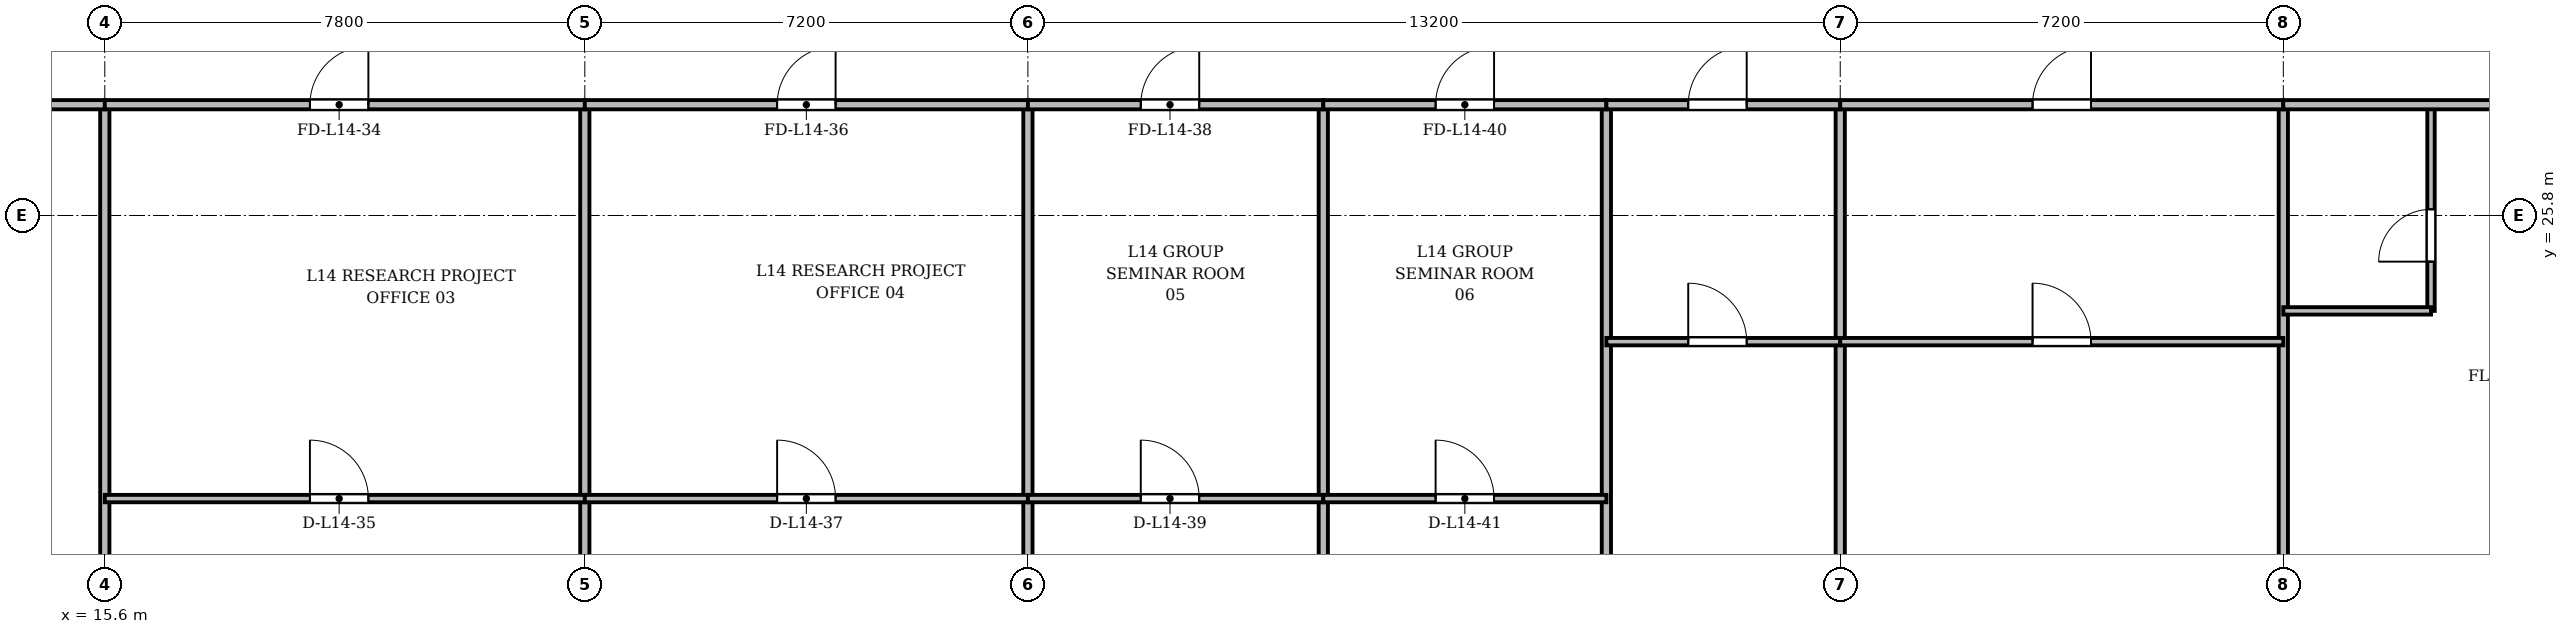
"""IFC4 building model, lengths in metres.
Left out: names, types, materials, properties, quantities, classifications, styles, units other than length and angle.
Written with IfcOpenShell. Run it as: python <this file> out.ifc"""

import sys

from ifc_helpers import new_model, si_unit, direction, frame, frame_2d, origin, place, context, subcontext, project, spatial, rectangle, extrude, source, transform, mapped, element, fill, save


model = new_model("IFC4")
c1 = context("Model", 3, precision=1e-05, world=origin(), true_north=direction((0.0, 1.0)))
c2 = subcontext(c1, "Body", "Model", "MODEL_VIEW")
j1 = project(units=[si_unit("LENGTHUNIT", "METRE"), si_unit("PLANEANGLEUNIT", "RADIAN")], contexts=[c1])
p1 = place(None, origin())
s1 = spatial("IfcSite", under=j1, at=p1, CompositionType="ELEMENT")
p2 = place(p1, origin())
s2 = spatial("IfcBuilding", under=s1, at=p2, CompositionType="ELEMENT")
p3 = place(p2, frame((0.0, 0.0, 55.9)))
s3 = spatial("IfcBuildingStorey", under=s2, at=p3, CompositionType="ELEMENT", Elevation=55.9)
for number, where, z_axis, x_axis in (
    (1, (15.6, 3.145, 0.0), (0.0, 0.0, 1.0), (0.0, 1.0, 0.0)),
    (2, (23.4, 3.145, 0.0), (0.0, 0.0, 1.0), (0.0, 1.0, 0.0)),
    (3, (30.6, 3.145, 0.0), (0.0, 0.0, 1.0), (0.0, 1.0, 0.0)),
):
    element("IfcWall", number, at=place(p3, frame(where, z_axis=z_axis, x_axis=x_axis)), inside=s3, PredefinedType="PARTITIONING", context=c2, shape_type="SweptSolid", body=[
        extrude(rectangle(XDim=24.455, YDim=0.15, at=frame_2d((12.228, 0.0))), origin(), (0.0, 0.0, 1.0), 2.752),
    ])
for number, where, z_axis, x_axis in (
    (4, (35.4, 3.145, 0.0), (0.0, 0.0, 1.0), (0.0, 1.0, 0.0)),
    (5, (40.0, 3.145, 0.0), (0.0, 0.0, 1.0), (0.0, 1.0, 0.0)),
):
    element("IfcWall", number, at=place(p3, frame(where, z_axis=z_axis, x_axis=x_axis)), inside=s3, PredefinedType="PARTITIONING", context=c2, shape_type="SweptSolid", body=[
        extrude(rectangle(XDim=24.455, YDim=0.15, at=frame_2d((12.228, 0.0))), origin(), (0.0, 0.0, 1.0), 2.69),
    ])
for number, where, z_axis, x_axis in (
    (6, (43.8, 3.145, 0.0), (0.0, 0.0, 1.0), (0.0, 1.0, 0.0)),
    (7, (51.0, 3.145, 0.0), (0.0, 0.0, 1.0), (0.0, 1.0, 0.0)),
):
    element("IfcWall", number, at=place(p3, frame(where, z_axis=z_axis, x_axis=x_axis)), inside=s3, PredefinedType="PARTITIONING", context=c2, shape_type="SweptSolid", body=[
        extrude(rectangle(XDim=24.455, YDim=0.15, at=frame_2d((12.228, 0.0))), origin(), (0.0, 0.0, 1.0), 2.752),
    ])
p4 = place(p3, frame((8.8, 27.6, 0.0), z_axis=(0.0, 0.0, 1.0), x_axis=(1.0, 0.0, 0.0)))
e8 = element("IfcWall", 8, at=p4, inside=s3, PredefinedType="PARTITIONING", context=c2, shape_type="SweptSolid", body=[
    extrude(rectangle(XDim=6.8, YDim=0.15, at=frame_2d((3.4, 0.0))), origin(), (0.0, 0.0, 1.0), 2.752),
])
p5 = place(p4, frame((4.49, 0.0, 0.0)))
e9 = element("IfcOpeningElement", 9, at=p5, cuts=e8, PredefinedType="OPENING", context=c2, shape_type="SweptSolid", body=[
    extrude(rectangle(XDim=0.95, YDim=2.15, at=frame_2d((0.475, 1.075))), frame((0.0, 0.085, 0.0), z_axis=(0.0, -1.0, 0.0), x_axis=(1.0, 0.0, 0.0)), (0.0, 0.0, 1.0), 0.17),
])
p6 = place(p3, frame((15.6, 27.6, 0.0), z_axis=(0.0, 0.0, 1.0), x_axis=(1.0, 0.0, 0.0)))
e10 = element("IfcWall", 10, at=p6, inside=s3, PredefinedType="PARTITIONING", context=c2, shape_type="SweptSolid", body=[
    extrude(rectangle(XDim=7.8, YDim=0.15, at=frame_2d((3.9, 0.0))), origin(), (0.0, 0.0, 1.0), 2.752),
])
p7 = place(p6, frame((3.333, 0.0, 0.0)))
e11 = element("IfcOpeningElement", 11, at=p7, cuts=e10, PredefinedType="OPENING", context=c2, shape_type="SweptSolid", body=[
    extrude(rectangle(XDim=0.95, YDim=2.15, at=frame_2d((0.475, 1.075))), frame((0.0, 0.085, 0.0), z_axis=(0.0, -1.0, 0.0), x_axis=(1.0, 0.0, 0.0)), (0.0, 0.0, 1.0), 0.17),
])
p8 = place(p3, frame((15.6, 21.2, 0.0), z_axis=(0.0, 0.0, 1.0), x_axis=(1.0, 0.0, 0.0)))
e12 = element("IfcWall", 12, at=p8, inside=s3, PredefinedType="PARTITIONING", context=c2, shape_type="SweptSolid", body=[
    extrude(rectangle(XDim=7.8, YDim=0.12, at=frame_2d((3.9, 0.0))), origin(), (0.0, 0.0, 1.0), 2.752),
])
p9 = place(p8, frame((3.333, 0.0, 0.0)))
e13 = element("IfcOpeningElement", 13, at=p9, cuts=e12, PredefinedType="OPENING", context=c2, shape_type="SweptSolid", body=[
    extrude(rectangle(XDim=0.95, YDim=2.15, at=frame_2d((0.475, 1.075))), frame((0.0, 0.07, 0.0), z_axis=(0.0, -1.0, 0.0), x_axis=(1.0, 0.0, 0.0)), (0.0, 0.0, 1.0), 0.14),
])
p10 = place(p3, frame((23.4, 27.6, 0.0), z_axis=(0.0, 0.0, 1.0), x_axis=(1.0, 0.0, 0.0)))
e14 = element("IfcWall", 14, at=p10, inside=s3, PredefinedType="PARTITIONING", context=c2, shape_type="SweptSolid", body=[
    extrude(rectangle(XDim=7.2, YDim=0.15, at=frame_2d((3.6, 0.0))), origin(), (0.0, 0.0, 1.0), 2.752),
])
p11 = place(p10, frame((3.125, 0.0, 0.0)))
e15 = element("IfcOpeningElement", 15, at=p11, cuts=e14, PredefinedType="OPENING", context=c2, shape_type="SweptSolid", body=[
    extrude(rectangle(XDim=0.95, YDim=2.15, at=frame_2d((0.475, 1.075))), frame((0.0, 0.085, 0.0), z_axis=(0.0, -1.0, 0.0), x_axis=(1.0, 0.0, 0.0)), (0.0, 0.0, 1.0), 0.17),
])
p12 = place(p3, frame((23.4, 21.2, 0.0), z_axis=(0.0, 0.0, 1.0), x_axis=(1.0, 0.0, 0.0)))
e16 = element("IfcWall", 16, at=p12, inside=s3, PredefinedType="PARTITIONING", context=c2, shape_type="SweptSolid", body=[
    extrude(rectangle(XDim=7.2, YDim=0.12, at=frame_2d((3.6, 0.0))), origin(), (0.0, 0.0, 1.0), 2.752),
])
p13 = place(p12, frame((3.125, 0.0, 0.0)))
e17 = element("IfcOpeningElement", 17, at=p13, cuts=e16, PredefinedType="OPENING", context=c2, shape_type="SweptSolid", body=[
    extrude(rectangle(XDim=0.95, YDim=2.15, at=frame_2d((0.475, 1.075))), frame((0.0, 0.07, 0.0), z_axis=(0.0, -1.0, 0.0), x_axis=(1.0, 0.0, 0.0)), (0.0, 0.0, 1.0), 0.14),
])
p14 = place(p3, frame((30.6, 27.6, 0.0), z_axis=(0.0, 0.0, 1.0), x_axis=(1.0, 0.0, 0.0)))
e18 = element("IfcWall", 18, at=p14, inside=s3, PredefinedType="PARTITIONING", context=c2, shape_type="SweptSolid", body=[
    extrude(rectangle(XDim=4.8, YDim=0.15, at=frame_2d((2.4, 0.0))), origin(), (0.0, 0.0, 1.0), 2.752),
])
p15 = place(p14, frame((1.834, 0.0, 0.0)))
e19 = element("IfcOpeningElement", 19, at=p15, cuts=e18, PredefinedType="OPENING", context=c2, shape_type="SweptSolid", body=[
    extrude(rectangle(XDim=0.95, YDim=2.15, at=frame_2d((0.475, 1.075))), frame((0.0, 0.085, 0.0), z_axis=(0.0, -1.0, 0.0), x_axis=(1.0, 0.0, 0.0)), (0.0, 0.0, 1.0), 0.17),
])
p16 = place(p3, frame((30.6, 21.2, 0.0), z_axis=(0.0, 0.0, 1.0), x_axis=(1.0, 0.0, 0.0)))
e20 = element("IfcWall", 20, at=p16, inside=s3, PredefinedType="PARTITIONING", context=c2, shape_type="SweptSolid", body=[
    extrude(rectangle(XDim=4.8, YDim=0.12, at=frame_2d((2.4, 0.0))), origin(), (0.0, 0.0, 1.0), 2.752),
])
p17 = place(p16, frame((1.834, 0.0, 0.0)))
e21 = element("IfcOpeningElement", 21, at=p17, cuts=e20, PredefinedType="OPENING", context=c2, shape_type="SweptSolid", body=[
    extrude(rectangle(XDim=0.95, YDim=2.15, at=frame_2d((0.475, 1.075))), frame((0.0, 0.07, 0.0), z_axis=(0.0, -1.0, 0.0), x_axis=(1.0, 0.0, 0.0)), (0.0, 0.0, 1.0), 0.14),
])
p18 = place(p3, frame((35.4, 27.6, 0.0), z_axis=(0.0, 0.0, 1.0), x_axis=(1.0, 0.0, 0.0)))
e22 = element("IfcWall", 22, at=p18, inside=s3, PredefinedType="PARTITIONING", context=c2, shape_type="SweptSolid", body=[
    extrude(rectangle(XDim=4.6, YDim=0.15, at=frame_2d((2.3, 0.0))), origin(), (0.0, 0.0, 1.0), 3.34),
])
p19 = place(p18, frame((1.825, 0.0, 0.0)))
e23 = element("IfcOpeningElement", 23, at=p19, cuts=e22, PredefinedType="OPENING", context=c2, shape_type="SweptSolid", body=[
    extrude(rectangle(XDim=0.95, YDim=2.15, at=frame_2d((0.475, 1.075))), frame((0.0, 0.085, 0.0), z_axis=(0.0, -1.0, 0.0), x_axis=(1.0, 0.0, 0.0)), (0.0, 0.0, 1.0), 0.17),
])
p20 = place(p3, frame((35.4, 21.2, 0.0), z_axis=(0.0, 0.0, 1.0), x_axis=(1.0, 0.0, 0.0)))
e24 = element("IfcWall", 24, at=p20, inside=s3, PredefinedType="PARTITIONING", context=c2, shape_type="SweptSolid", body=[
    extrude(rectangle(XDim=4.6, YDim=0.12, at=frame_2d((2.3, 0.0))), origin(), (0.0, 0.0, 1.0), 3.34),
])
p21 = place(p20, frame((1.825, 0.0, 0.0)))
e25 = element("IfcOpeningElement", 25, at=p21, cuts=e24, PredefinedType="OPENING", context=c2, shape_type="SweptSolid", body=[
    extrude(rectangle(XDim=0.95, YDim=2.15, at=frame_2d((0.475, 1.075))), frame((0.0, 0.07, 0.0), z_axis=(0.0, -1.0, 0.0), x_axis=(1.0, 0.0, 0.0)), (0.0, 0.0, 1.0), 0.14),
])
p22 = place(p3, frame((40.0, 27.6, 0.0), z_axis=(0.0, 0.0, 1.0), x_axis=(1.0, 0.0, 0.0)))
e26 = element("IfcWall", 26, at=p22, inside=s3, PredefinedType="PARTITIONING", context=c2, shape_type="SweptSolid", body=[
    extrude(rectangle(XDim=3.8, YDim=0.15, at=frame_2d((1.9, 0.0))), origin(), (0.0, 0.0, 1.0), 2.752),
])
p23 = place(p22, frame((1.33, 0.0, 0.0)))
e27 = element("IfcOpeningElement", 27, at=p23, cuts=e26, PredefinedType="OPENING", context=c2, shape_type="SweptSolid", body=[
    extrude(rectangle(XDim=0.95, YDim=2.15, at=frame_2d((0.475, 1.075))), frame((0.0, 0.085, 0.0), z_axis=(0.0, -1.0, 0.0), x_axis=(1.0, 0.0, 0.0)), (0.0, 0.0, 1.0), 0.17),
])
p24 = place(p3, frame((40.0, 23.75, 0.0), z_axis=(0.0, 0.0, 1.0), x_axis=(1.0, 0.0, 0.0)))
e28 = element("IfcWall", 28, at=p24, inside=s3, PredefinedType="PARTITIONING", context=c2, shape_type="SweptSolid", body=[
    extrude(rectangle(XDim=3.8, YDim=0.12, at=frame_2d((1.9, 0.0))), origin(), (0.0, 0.0, 1.0), 2.752),
])
p25 = place(p24, frame((1.33, 0.0, 0.0)))
e29 = element("IfcOpeningElement", 29, at=p25, cuts=e28, PredefinedType="OPENING", context=c2, shape_type="SweptSolid", body=[
    extrude(rectangle(XDim=0.95, YDim=2.15, at=frame_2d((0.475, 1.075))), frame((0.0, 0.07, 0.0), z_axis=(0.0, -1.0, 0.0), x_axis=(1.0, 0.0, 0.0)), (0.0, 0.0, 1.0), 0.14),
])
p26 = place(p3, frame((43.8, 27.6, 0.0), z_axis=(0.0, 0.0, 1.0), x_axis=(1.0, 0.0, 0.0)))
e30 = element("IfcWall", 30, at=p26, inside=s3, PredefinedType="PARTITIONING", context=c2, shape_type="SweptSolid", body=[
    extrude(rectangle(XDim=7.2, YDim=0.15, at=frame_2d((3.6, 0.0))), origin(), (0.0, 0.0, 1.0), 2.752),
])
p27 = place(p26, frame((3.125, 0.0, 0.0)))
e31 = element("IfcOpeningElement", 31, at=p27, cuts=e30, PredefinedType="OPENING", context=c2, shape_type="SweptSolid", body=[
    extrude(rectangle(XDim=0.95, YDim=2.15, at=frame_2d((0.475, 1.075))), frame((0.0, 0.085, 0.0), z_axis=(0.0, -1.0, 0.0), x_axis=(1.0, 0.0, 0.0)), (0.0, 0.0, 1.0), 0.17),
])
p28 = place(p3, frame((43.8, 23.75, 0.0), z_axis=(0.0, 0.0, 1.0), x_axis=(1.0, 0.0, 0.0)))
e32 = element("IfcWall", 32, at=p28, inside=s3, PredefinedType="PARTITIONING", context=c2, shape_type="SweptSolid", body=[
    extrude(rectangle(XDim=7.2, YDim=0.12, at=frame_2d((3.6, 0.0))), origin(), (0.0, 0.0, 1.0), 2.752),
])
p29 = place(p28, frame((3.125, 0.0, 0.0)))
e33 = element("IfcOpeningElement", 33, at=p29, cuts=e32, PredefinedType="OPENING", context=c2, shape_type="SweptSolid", body=[
    extrude(rectangle(XDim=0.95, YDim=2.15, at=frame_2d((0.475, 1.075))), frame((0.0, 0.07, 0.0), z_axis=(0.0, -1.0, 0.0), x_axis=(1.0, 0.0, 0.0)), (0.0, 0.0, 1.0), 0.14),
])
p30 = place(p3, frame((53.4, 24.25, 0.0), z_axis=(0.0, 0.0, 1.0), x_axis=(0.0, 1.0, 0.0)))
e34 = element("IfcWall", 34, at=p30, inside=s3, PredefinedType="PARTITIONING", context=c2, shape_type="SweptSolid", body=[
    extrude(rectangle(XDim=3.35, YDim=0.12, at=frame_2d((1.675, 0.0))), origin(), (0.0, 0.0, 1.0), 2.94),
])
p31 = place(p30, frame((0.8, 0.0, 0.0)))
e35 = element("IfcOpeningElement", 35, at=p31, cuts=e34, PredefinedType="OPENING", context=c2, shape_type="SweptSolid", body=[
    extrude(rectangle(XDim=0.85, YDim=2.1, at=frame_2d((0.425, 1.05))), frame((0.0, 0.07, 0.0), z_axis=(0.0, -1.0, 0.0), x_axis=(1.0, 0.0, 0.0)), (0.0, 0.0, 1.0), 0.14),
])
p32 = place(p3, frame((51.0, 24.25, 0.0), z_axis=(0.0, 0.0, 1.0), x_axis=(1.0, 0.0, 0.0)))
e36 = element("IfcWall", 36, at=p32, inside=s3, PredefinedType="PARTITIONING", context=c2, shape_type="SweptSolid", body=[
    extrude(rectangle(XDim=2.4, YDim=0.12, at=frame_2d((1.2, 0.0))), origin(), (0.0, 0.0, 1.0), 2.752),
])
p33 = place(p3, frame((51.0, 27.6, 0.0), z_axis=(0.0, 0.0, 1.0), x_axis=(1.0, 0.0, 0.0)))
e37 = element("IfcWall", 37, at=p33, inside=s3, PredefinedType="PARTITIONING", context=c2, shape_type="SweptSolid", body=[
    extrude(rectangle(XDim=7.8, YDim=0.15, at=frame_2d((3.9, 0.0))), origin(), (0.0, 0.0, 1.0), 2.752),
])
p34 = place(p33, frame((5.172, 0.0, 0.0)))
e38 = element("IfcOpeningElement", 38, at=p34, cuts=e37, PredefinedType="OPENING", context=c2, shape_type="SweptSolid", body=[
    extrude(rectangle(XDim=0.95, YDim=2.15, at=frame_2d((0.475, 1.075))), frame((0.0, 0.085, 0.0), z_axis=(0.0, -1.0, 0.0), x_axis=(1.0, 0.0, 0.0)), (0.0, 0.0, 1.0), 0.17),
])
m1 = source(origin(), c2, "Body", "SweptSolid", [
    extrude(rectangle(XDim=0.95, YDim=2.15, at=frame_2d((0.475, 1.075))), frame((0.0, 0.025, 0.0), z_axis=(0.0, -1.0, 0.0), x_axis=(1.0, 0.0, 0.0)), (0.0, 0.0, 1.0), 0.05),
])
p35 = place(p7, origin())
e39 = element("IfcDoor", 39, at=p35, inside=s3, OperationType="SINGLE_SWING_RIGHT", PredefinedType="DOOR", context=c2, shape_type="MappedRepresentation", body=[
    mapped(m1, transform((0.0, 0.0, 0.0), x_axis=(1.0, 0.0, 0.0), y_axis=(0.0, 1.0, 0.0), z_axis=(0.0, 0.0, 1.0), scale=1.0)),
])
fill(e11, e39)
p36 = place(p9, origin())
e40 = element("IfcDoor", 40, at=p36, inside=s3, OperationType="SINGLE_SWING_LEFT", PredefinedType="DOOR", context=c2, shape_type="MappedRepresentation", body=[
    mapped(m1, transform((0.0, 0.0, 0.0), x_axis=(1.0, 0.0, 0.0), y_axis=(0.0, 1.0, 0.0), z_axis=(0.0, 0.0, 1.0), scale=1.0)),
])
fill(e13, e40)
p37 = place(p11, origin())
e41 = element("IfcDoor", 41, at=p37, inside=s3, OperationType="SINGLE_SWING_RIGHT", PredefinedType="DOOR", context=c2, shape_type="MappedRepresentation", body=[
    mapped(m1, transform((0.0, 0.0, 0.0), x_axis=(1.0, 0.0, 0.0), y_axis=(0.0, 1.0, 0.0), z_axis=(0.0, 0.0, 1.0), scale=1.0)),
])
fill(e15, e41)
p38 = place(p13, origin())
e42 = element("IfcDoor", 42, at=p38, inside=s3, OperationType="SINGLE_SWING_LEFT", PredefinedType="DOOR", context=c2, shape_type="MappedRepresentation", body=[
    mapped(m1, transform((0.0, 0.0, 0.0), x_axis=(1.0, 0.0, 0.0), y_axis=(0.0, 1.0, 0.0), z_axis=(0.0, 0.0, 1.0), scale=1.0)),
])
fill(e17, e42)
p39 = place(p15, origin())
e43 = element("IfcDoor", 43, at=p39, inside=s3, OperationType="SINGLE_SWING_RIGHT", PredefinedType="DOOR", context=c2, shape_type="MappedRepresentation", body=[
    mapped(m1, transform((0.0, 0.0, 0.0), x_axis=(1.0, 0.0, 0.0), y_axis=(0.0, 1.0, 0.0), z_axis=(0.0, 0.0, 1.0), scale=1.0)),
])
fill(e19, e43)
p40 = place(p17, origin())
e44 = element("IfcDoor", 44, at=p40, inside=s3, OperationType="SINGLE_SWING_LEFT", PredefinedType="DOOR", context=c2, shape_type="MappedRepresentation", body=[
    mapped(m1, transform((0.0, 0.0, 0.0), x_axis=(1.0, 0.0, 0.0), y_axis=(0.0, 1.0, 0.0), z_axis=(0.0, 0.0, 1.0), scale=1.0)),
])
fill(e21, e44)
p41 = place(p19, origin())
e45 = element("IfcDoor", 45, at=p41, inside=s3, OperationType="SINGLE_SWING_RIGHT", PredefinedType="DOOR", context=c2, shape_type="MappedRepresentation", body=[
    mapped(m1, transform((0.0, 0.0, 0.0), x_axis=(1.0, 0.0, 0.0), y_axis=(0.0, 1.0, 0.0), z_axis=(0.0, 0.0, 1.0), scale=1.0)),
])
fill(e23, e45)
p42 = place(p21, origin())
e46 = element("IfcDoor", 46, at=p42, inside=s3, OperationType="SINGLE_SWING_LEFT", PredefinedType="DOOR", context=c2, shape_type="MappedRepresentation", body=[
    mapped(m1, transform((0.0, 0.0, 0.0), x_axis=(1.0, 0.0, 0.0), y_axis=(0.0, 1.0, 0.0), z_axis=(0.0, 0.0, 1.0), scale=1.0)),
])
fill(e25, e46)
p43 = place(p23, origin())
e47 = element("IfcDoor", 47, at=p43, inside=s3, OperationType="SINGLE_SWING_RIGHT", PredefinedType="DOOR", context=c2, shape_type="MappedRepresentation", body=[
    mapped(m1, transform((0.0, 0.0, 0.0), x_axis=(1.0, 0.0, 0.0), y_axis=(0.0, 1.0, 0.0), z_axis=(0.0, 0.0, 1.0), scale=1.0)),
])
fill(e27, e47)
p44 = place(p25, origin())
e48 = element("IfcDoor", 48, at=p44, inside=s3, OperationType="SINGLE_SWING_LEFT", PredefinedType="DOOR", context=c2, shape_type="MappedRepresentation", body=[
    mapped(m1, transform((0.0, 0.0, 0.0), x_axis=(1.0, 0.0, 0.0), y_axis=(0.0, 1.0, 0.0), z_axis=(0.0, 0.0, 1.0), scale=1.0)),
])
fill(e29, e48)
p45 = place(p27, origin())
e49 = element("IfcDoor", 49, at=p45, inside=s3, OperationType="SINGLE_SWING_RIGHT", PredefinedType="DOOR", context=c2, shape_type="MappedRepresentation", body=[
    mapped(m1, transform((0.0, 0.0, 0.0), x_axis=(1.0, 0.0, 0.0), y_axis=(0.0, 1.0, 0.0), z_axis=(0.0, 0.0, 1.0), scale=1.0)),
])
fill(e31, e49)
p46 = place(p29, origin())
e50 = element("IfcDoor", 50, at=p46, inside=s3, OperationType="SINGLE_SWING_LEFT", PredefinedType="DOOR", context=c2, shape_type="MappedRepresentation", body=[
    mapped(m1, transform((0.0, 0.0, 0.0), x_axis=(1.0, 0.0, 0.0), y_axis=(0.0, 1.0, 0.0), z_axis=(0.0, 0.0, 1.0), scale=1.0)),
])
fill(e33, e50)
m2 = source(origin(), c2, "Body", "SweptSolid", [
    extrude(rectangle(XDim=0.85, YDim=2.1, at=frame_2d((0.425, 1.05))), frame((0.0, 0.025, 0.0), z_axis=(0.0, -1.0, 0.0), x_axis=(1.0, 0.0, 0.0)), (0.0, 0.0, 1.0), 0.05),
])
p47 = place(p31, origin())
e51 = element("IfcDoor", 51, at=p47, inside=s3, OperationType="SINGLE_SWING_LEFT", PredefinedType="DOOR", context=c2, shape_type="MappedRepresentation", body=[
    mapped(m2, transform((0.0, 0.0, 0.0), x_axis=(1.0, 0.0, 0.0), y_axis=(0.0, 1.0, 0.0), z_axis=(0.0, 0.0, 1.0), scale=1.0)),
])
fill(e35, e51)
save(model, sys.argv[1])
